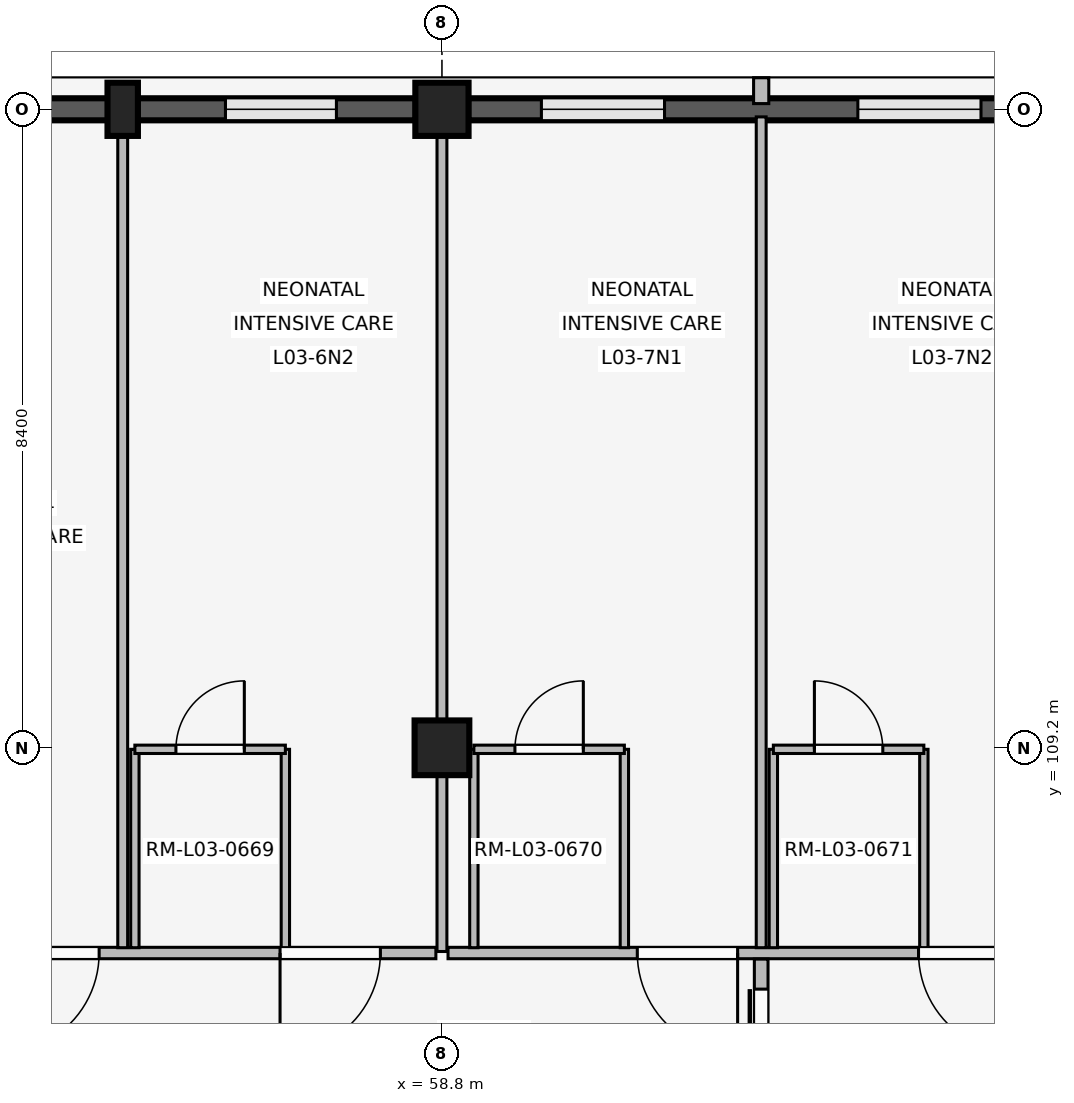
"""IFC4 building model, lengths in metres.
Left out: names, types, materials, properties, quantities, classifications, styles, units other than length and angle.
Written with IfcOpenShell. Run it as: python <this file> out.ifc"""

import sys

from ifc_helpers import new_model, si_unit, direction, frame, frame_2d, origin, origin_2d, place, context, subcontext, project, spatial, rectangle, extrude, element, fill, save


model = new_model("IFC4")
c1 = context("Model", 3, precision=1e-05, world=origin(), true_north=direction((0.0, 1.0)))
c2 = subcontext(c1, "Body", "Model", "MODEL_VIEW")
j1 = project(units=[si_unit("LENGTHUNIT", "METRE"), si_unit("PLANEANGLEUNIT", "RADIAN")], contexts=[c1])
p1 = place(None, origin())
s1 = spatial("IfcSite", under=j1, at=p1, CompositionType="ELEMENT")
p2 = place(p1, origin())
s2 = spatial("IfcBuilding", under=s1, at=p2, CompositionType="ELEMENT")
p3 = place(p2, frame((0.0, 0.0, 12.9)))
s3 = spatial("IfcBuildingStorey", under=s2, at=p3, CompositionType="ELEMENT", Elevation=12.9)
p4 = place(p3, frame((58.8, 109.2, 0.0), z_axis=(0.0, 0.0, 1.0), x_axis=(1.0, 0.0, 0.0)))
e1 = element("IfcColumn", 1, at=p4, inside=s3, PredefinedType="COLUMN", context=c2, shape_type="SweptSolid", body=[
    extrude(rectangle(XDim=0.72, YDim=0.72, at=origin_2d()), origin(), (0.0, 0.0, 1.0), 3.3),
])
p5 = place(p3, frame((58.8, 117.6, 0.0), z_axis=(0.0, 0.0, 1.0), x_axis=(1.0, 0.0, 0.0)))
e2 = element("IfcColumn", 2, at=p5, inside=s3, PredefinedType="COLUMN", context=c2, shape_type="SweptSolid", body=[
    extrude(rectangle(XDim=0.7, YDim=0.7, at=origin_2d()), origin(), (0.0, 0.0, 1.0), 3.3),
])
p6 = place(p3, frame((54.6, 117.6, 0.0), z_axis=(0.0, 0.0, 1.0), x_axis=(1.0, 0.0, 0.0)))
e3 = element("IfcColumn", 3, at=p6, inside=s3, PredefinedType="PILASTER", context=c2, shape_type="SweptSolid", body=[
    extrude(rectangle(XDim=0.4, YDim=0.7, at=origin_2d()), origin(), (0.0, 0.0, 1.0), 3.3),
])
p7 = place(p3, frame((50.745, 117.6, 0.0), z_axis=(0.0, 0.0, 1.0), x_axis=(1.0, 0.0, 0.0)))
e4 = element("IfcWall", 4, at=p7, inside=s3, PredefinedType="SOLIDWALL", context=c2, shape_type="SweptSolid", body=[
    extrude(rectangle(XDim=7.71, YDim=0.29, at=frame_2d((3.855, 0.0))), origin(), (0.0, 0.0, 1.0), 2.44),
])
p8 = place(p7, frame((1.043, 0.0, 0.85)))
e5 = element("IfcOpeningElement", 5, at=p8, cuts=e4, PredefinedType="OPENING", context=c2, shape_type="SweptSolid", body=[
    extrude(rectangle(XDim=1.46, YDim=0.85, at=frame_2d((0.73, 0.425))), frame((0.0, 0.155, 0.0), z_axis=(0.0, -1.0, 0.0), x_axis=(1.0, 0.0, 0.0)), (0.0, 0.0, 1.0), 0.31),
])
p9 = place(p7, frame((5.207, 0.0, 0.85)))
e6 = element("IfcOpeningElement", 6, at=p9, cuts=e4, PredefinedType="OPENING", context=c2, shape_type="SweptSolid", body=[
    extrude(rectangle(XDim=1.46, YDim=0.85, at=frame_2d((0.73, 0.425))), frame((0.0, 0.155, 0.0), z_axis=(0.0, -1.0, 0.0), x_axis=(1.0, 0.0, 0.0)), (0.0, 0.0, 1.0), 0.31),
])
p10 = place(p3, frame((59.145, 117.6, 0.0), z_axis=(0.0, 0.0, 1.0), x_axis=(1.0, 0.0, 0.0)))
e7 = element("IfcWall", 7, at=p10, inside=s3, PredefinedType="SOLIDWALL", context=c2, shape_type="SweptSolid", body=[
    extrude(rectangle(XDim=7.71, YDim=0.29, at=frame_2d((3.855, 0.0))), origin(), (0.0, 0.0, 1.0), 2.44),
])
p11 = place(p10, frame((0.963, 0.0, 0.85)))
e8 = element("IfcOpeningElement", 8, at=p11, cuts=e7, PredefinedType="OPENING", context=c2, shape_type="SweptSolid", body=[
    extrude(rectangle(XDim=1.62, YDim=0.95, at=frame_2d((0.81, 0.475))), frame((0.0, 0.155, 0.0), z_axis=(0.0, -1.0, 0.0), x_axis=(1.0, 0.0, 0.0)), (0.0, 0.0, 1.0), 0.31),
])
p12 = place(p10, frame((5.127, 0.0, 0.85)))
e9 = element("IfcOpeningElement", 9, at=p12, cuts=e7, PredefinedType="OPENING", context=c2, shape_type="SweptSolid", body=[
    extrude(rectangle(XDim=1.62, YDim=0.95, at=frame_2d((0.81, 0.475))), frame((0.0, 0.155, 0.0), z_axis=(0.0, -1.0, 0.0), x_axis=(1.0, 0.0, 0.0)), (0.0, 0.0, 1.0), 0.31),
])
p13 = place(p3, frame((63.0, 117.675, 0.0), z_axis=(0.0, 0.0, 1.0), x_axis=(0.0, 1.0, 0.0)))
e10 = element("IfcWall", 10, at=p13, inside=s3, PredefinedType="ELEMENTEDWALL", context=c2, shape_type="SweptSolid", body=[
    extrude(rectangle(XDim=0.34, YDim=0.2, at=frame_2d((0.17, 0.0))), origin(), (0.0, 0.0, 1.0), 2.42),
])
p14 = place(p3, frame((58.72, 106.5, 0.0), z_axis=(0.0, 0.0, 1.0), x_axis=(-1.0, 0.0, 0.0)))
e11 = element("IfcWall", 11, at=p14, inside=s3, PredefinedType="PARTITIONING", context=c2, shape_type="SweptSolid", body=[
    extrude(rectangle(XDim=7.96, YDim=0.15, at=frame_2d((3.98, 0.0))), origin(), (0.0, 0.0, 1.0), 2.42),
])
p15 = place(p14, frame((0.73, 0.0, 0.0)))
e12 = element("IfcOpeningElement", 12, at=p15, cuts=e11, PredefinedType="OPENING", context=c2, shape_type="SweptSolid", body=[
    extrude(rectangle(XDim=1.32, YDim=2.25, at=frame_2d((0.66, 1.125))), frame((0.0, 0.085, 0.0), z_axis=(0.0, -1.0, 0.0), x_axis=(1.0, 0.0, 0.0)), (0.0, 0.0, 1.0), 0.17),
])
p16 = place(p14, frame((4.43, 0.0, 0.0)))
e13 = element("IfcOpeningElement", 13, at=p16, cuts=e11, PredefinedType="OPENING", context=c2, shape_type="SweptSolid", body=[
    extrude(rectangle(XDim=1.32, YDim=2.25, at=frame_2d((0.66, 1.125))), frame((0.0, 0.085, 0.0), z_axis=(0.0, -1.0, 0.0), x_axis=(1.0, 0.0, 0.0)), (0.0, 0.0, 1.0), 0.17),
])
p17 = place(p3, frame((54.6, 106.57, 0.0), z_axis=(0.0, 0.0, 1.0), x_axis=(0.0, 1.0, 0.0)))
e14 = element("IfcWall", 14, at=p17, inside=s3, PredefinedType="PARTITIONING", context=c2, shape_type="SweptSolid", body=[
    extrude(rectangle(XDim=10.93, YDim=0.13, at=frame_2d((5.465, 0.0))), origin(), (0.0, 0.0, 1.0), 2.42),
])
for number, where, z_axis, x_axis in (
    (15, (54.76, 106.57, 0.0), (0.0, 0.0, 1.0), (0.0, 1.0, 0.0)),
    (16, (56.74, 106.57, 0.0), (0.0, 0.0, 1.0), (0.0, 1.0, 0.0)),
):
    element("IfcWall", number, at=place(p3, frame(where, z_axis=z_axis, x_axis=x_axis)), inside=s3, PredefinedType="PARTITIONING", context=c2, shape_type="SweptSolid", body=[
        extrude(rectangle(XDim=2.61, YDim=0.11, at=frame_2d((1.305, 0.0))), origin(), (0.0, 0.0, 1.0), 2.42),
    ])
p18 = place(p3, frame((54.76, 109.18, 0.0), z_axis=(0.0, 0.0, 1.0), x_axis=(1.0, 0.0, 0.0)))
e17 = element("IfcWall", 17, at=p18, inside=s3, PredefinedType="PARTITIONING", context=c2, shape_type="SweptSolid", body=[
    extrude(rectangle(XDim=1.98, YDim=0.11, at=frame_2d((0.99, 0.0))), origin(), (0.0, 0.0, 1.0), 2.42),
])
p19 = place(p18, frame((0.54, 0.0, 0.0)))
e18 = element("IfcOpeningElement", 18, at=p19, cuts=e17, PredefinedType="OPENING", context=c2, shape_type="SweptSolid", body=[
    extrude(rectangle(XDim=0.9, YDim=2.1, at=frame_2d((0.45, 1.05))), frame((0.0, 0.065, 0.0), z_axis=(0.0, -1.0, 0.0), x_axis=(1.0, 0.0, 0.0)), (0.0, 0.0, 1.0), 0.13),
])
p20 = place(p3, frame((58.8, 106.52, 0.0), z_axis=(0.0, 0.0, 1.0), x_axis=(0.0, 1.0, 0.0)))
e19 = element("IfcWall", 19, at=p20, inside=s3, PredefinedType="PARTITIONING", context=c2, shape_type="SweptSolid", body=[
    extrude(rectangle(XDim=10.94, YDim=0.13, at=frame_2d((5.47, 0.0))), origin(), (0.0, 0.0, 1.0), 2.42),
])
p21 = place(p3, frame((67.12, 106.5, 0.0), z_axis=(0.0, 0.0, 1.0), x_axis=(-1.0, 0.0, 0.0)))
e20 = element("IfcWall", 20, at=p21, inside=s3, PredefinedType="PARTITIONING", context=c2, shape_type="SweptSolid", body=[
    extrude(rectangle(XDim=8.24, YDim=0.15, at=frame_2d((4.12, 0.0))), origin(), (0.0, 0.0, 1.0), 2.42),
])
p22 = place(p21, frame((0.73, 0.0, 0.0)))
e21 = element("IfcOpeningElement", 21, at=p22, cuts=e20, PredefinedType="OPENING", context=c2, shape_type="SweptSolid", body=[
    extrude(rectangle(XDim=1.32, YDim=2.25, at=frame_2d((0.66, 1.125))), frame((0.0, 0.085, 0.0), z_axis=(0.0, -1.0, 0.0), x_axis=(1.0, 0.0, 0.0)), (0.0, 0.0, 1.0), 0.17),
])
p23 = place(p21, frame((4.43, 0.0, 0.0)))
e22 = element("IfcOpeningElement", 22, at=p23, cuts=e20, PredefinedType="OPENING", context=c2, shape_type="SweptSolid", body=[
    extrude(rectangle(XDim=1.32, YDim=2.25, at=frame_2d((0.66, 1.125))), frame((0.0, 0.085, 0.0), z_axis=(0.0, -1.0, 0.0), x_axis=(1.0, 0.0, 0.0)), (0.0, 0.0, 1.0), 0.17),
])
p24 = place(p3, frame((63.0, 106.57, 0.0), z_axis=(0.0, 0.0, 1.0), x_axis=(0.0, 1.0, 0.0)))
e23 = element("IfcWall", 23, at=p24, inside=s3, PredefinedType="PARTITIONING", context=c2, shape_type="SweptSolid", body=[
    extrude(rectangle(XDim=10.93, YDim=0.13, at=frame_2d((5.465, 0.0))), origin(), (0.0, 0.0, 1.0), 2.42),
])
for number, where, z_axis, x_axis in (
    (24, (59.22, 106.57, 0.0), (0.0, 0.0, 1.0), (0.0, 1.0, 0.0)),
    (25, (61.2, 106.57, 0.0), (0.0, 0.0, 1.0), (0.0, 1.0, 0.0)),
):
    element("IfcWall", number, at=place(p3, frame(where, z_axis=z_axis, x_axis=x_axis)), inside=s3, PredefinedType="PARTITIONING", context=c2, shape_type="SweptSolid", body=[
        extrude(rectangle(XDim=2.61, YDim=0.11, at=frame_2d((1.305, 0.0))), origin(), (0.0, 0.0, 1.0), 2.42),
    ])
p25 = place(p3, frame((59.22, 109.18, 0.0), z_axis=(0.0, 0.0, 1.0), x_axis=(1.0, 0.0, 0.0)))
e26 = element("IfcWall", 26, at=p25, inside=s3, PredefinedType="PARTITIONING", context=c2, shape_type="SweptSolid", body=[
    extrude(rectangle(XDim=1.98, YDim=0.11, at=frame_2d((0.99, 0.0))), origin(), (0.0, 0.0, 1.0), 2.42),
])
p26 = place(p25, frame((0.54, 0.0, 0.0)))
e27 = element("IfcOpeningElement", 27, at=p26, cuts=e26, PredefinedType="OPENING", context=c2, shape_type="SweptSolid", body=[
    extrude(rectangle(XDim=0.9, YDim=2.1, at=frame_2d((0.45, 1.05))), frame((0.0, 0.065, 0.0), z_axis=(0.0, -1.0, 0.0), x_axis=(1.0, 0.0, 0.0)), (0.0, 0.0, 1.0), 0.13),
])
for number, where, z_axis, x_axis in (
    (28, (63.16, 106.57, 0.0), (0.0, 0.0, 1.0), (0.0, 1.0, 0.0)),
    (29, (65.14, 106.57, 0.0), (0.0, 0.0, 1.0), (0.0, 1.0, 0.0)),
):
    element("IfcWall", number, at=place(p3, frame(where, z_axis=z_axis, x_axis=x_axis)), inside=s3, PredefinedType="PARTITIONING", context=c2, shape_type="SweptSolid", body=[
        extrude(rectangle(XDim=2.61, YDim=0.11, at=frame_2d((1.305, 0.0))), origin(), (0.0, 0.0, 1.0), 2.42),
    ])
p27 = place(p3, frame((63.16, 109.18, 0.0), z_axis=(0.0, 0.0, 1.0), x_axis=(1.0, 0.0, 0.0)))
e30 = element("IfcWall", 30, at=p27, inside=s3, PredefinedType="PARTITIONING", context=c2, shape_type="SweptSolid", body=[
    extrude(rectangle(XDim=1.98, YDim=0.11, at=frame_2d((0.99, 0.0))), origin(), (0.0, 0.0, 1.0), 2.42),
])
p28 = place(p27, frame((0.54, 0.0, 0.0)))
e31 = element("IfcOpeningElement", 31, at=p28, cuts=e30, PredefinedType="OPENING", context=c2, shape_type="SweptSolid", body=[
    extrude(rectangle(XDim=0.9, YDim=2.1, at=frame_2d((0.45, 1.05))), frame((0.0, 0.065, 0.0), z_axis=(0.0, -1.0, 0.0), x_axis=(1.0, 0.0, 0.0)), (0.0, 0.0, 1.0), 0.13),
])
p29 = place(p3, frame((63.0, 103.58, 0.0), z_axis=(0.0, 0.0, 1.0), x_axis=(0.0, 1.0, 0.0)))
e32 = element("IfcWall", 32, at=p29, inside=s3, PredefinedType="PARTITIONING", context=c2, shape_type="SweptSolid", body=[
    extrude(rectangle(XDim=2.84, YDim=0.18, at=frame_2d((1.42, 0.0))), origin(), (0.0, 0.0, 1.0), 2.42),
])
p30 = place(p29, frame((0.395, 0.0, 0.0)))
e33 = element("IfcOpeningElement", 33, at=p30, cuts=e32, PredefinedType="OPENING", context=c2, shape_type="SweptSolid", body=[
    extrude(rectangle(XDim=2.05, YDim=2.35, at=frame_2d((1.025, 1.175))), frame((0.0, 0.1, 0.0), z_axis=(0.0, -1.0, 0.0), x_axis=(1.0, 0.0, 0.0)), (0.0, 0.0, 1.0), 0.2),
])
p31 = place(p9, origin())
e34 = element("IfcWindow", 34, at=p31, inside=s3, PartitioningType="SINGLE_PANEL", PredefinedType="WINDOW", context=c2, shape_type="SweptSolid", body=[
    extrude(rectangle(XDim=1.46, YDim=0.85, at=frame_2d((0.73, 0.425))), frame((0.0, 0.03, 0.0), z_axis=(0.0, -1.0, 0.0), x_axis=(1.0, 0.0, 0.0)), (0.0, 0.0, 1.0), 0.06),
])
fill(e6, e34)
p32 = place(p11, origin())
e35 = element("IfcWindow", 35, at=p32, inside=s3, PartitioningType="SINGLE_PANEL", PredefinedType="WINDOW", context=c2, shape_type="SweptSolid", body=[
    extrude(rectangle(XDim=1.62, YDim=0.95, at=frame_2d((0.81, 0.475))), frame((0.0, 0.03, 0.0), z_axis=(0.0, -1.0, 0.0), x_axis=(1.0, 0.0, 0.0)), (0.0, 0.0, 1.0), 0.06),
])
fill(e8, e35)
p33 = place(p12, origin())
e36 = element("IfcWindow", 36, at=p33, inside=s3, PartitioningType="SINGLE_PANEL", PredefinedType="WINDOW", context=c2, shape_type="SweptSolid", body=[
    extrude(rectangle(XDim=1.62, YDim=0.95, at=frame_2d((0.81, 0.475))), frame((0.0, 0.03, 0.0), z_axis=(0.0, -1.0, 0.0), x_axis=(1.0, 0.0, 0.0)), (0.0, 0.0, 1.0), 0.06),
])
fill(e9, e36)
p34 = place(p15, origin())
e37 = element("IfcDoor", 37, at=p34, inside=s3, OperationType="SINGLE_SWING_RIGHT", PredefinedType="DOOR", context=c2, shape_type="SweptSolid", body=[
    extrude(rectangle(XDim=1.32, YDim=2.25, at=frame_2d((0.66, 1.125))), frame((0.0, 0.025, 0.0), z_axis=(0.0, -1.0, 0.0), x_axis=(1.0, 0.0, 0.0)), (0.0, 0.0, 1.0), 0.05),
])
fill(e12, e37)
p35 = place(p16, origin())
e38 = element("IfcDoor", 38, at=p35, inside=s3, OperationType="SINGLE_SWING_RIGHT", PredefinedType="DOOR", context=c2, shape_type="SweptSolid", body=[
    extrude(rectangle(XDim=1.32, YDim=2.25, at=frame_2d((0.66, 1.125))), frame((0.0, 0.025, 0.0), z_axis=(0.0, -1.0, 0.0), x_axis=(1.0, 0.0, 0.0)), (0.0, 0.0, 1.0), 0.05),
])
fill(e13, e38)
p36 = place(p19, origin())
e39 = element("IfcDoor", 39, at=p36, inside=s3, OperationType="SINGLE_SWING_RIGHT", PredefinedType="DOOR", context=c2, shape_type="SweptSolid", body=[
    extrude(rectangle(XDim=0.9, YDim=2.1, at=frame_2d((0.45, 1.05))), frame((0.0, 0.025, 0.0), z_axis=(0.0, -1.0, 0.0), x_axis=(1.0, 0.0, 0.0)), (0.0, 0.0, 1.0), 0.05),
])
fill(e18, e39)
p37 = place(p22, origin())
e40 = element("IfcDoor", 40, at=p37, inside=s3, OperationType="SINGLE_SWING_LEFT", PredefinedType="DOOR", context=c2, shape_type="SweptSolid", body=[
    extrude(rectangle(XDim=1.32, YDim=2.25, at=frame_2d((0.66, 1.125))), frame((0.0, 0.025, 0.0), z_axis=(0.0, -1.0, 0.0), x_axis=(1.0, 0.0, 0.0)), (0.0, 0.0, 1.0), 0.05),
])
fill(e21, e40)
p38 = place(p23, origin())
e41 = element("IfcDoor", 41, at=p38, inside=s3, OperationType="SINGLE_SWING_LEFT", PredefinedType="DOOR", context=c2, shape_type="SweptSolid", body=[
    extrude(rectangle(XDim=1.32, YDim=2.25, at=frame_2d((0.66, 1.125))), frame((0.0, 0.025, 0.0), z_axis=(0.0, -1.0, 0.0), x_axis=(1.0, 0.0, 0.0)), (0.0, 0.0, 1.0), 0.05),
])
fill(e22, e41)
p39 = place(p26, origin())
e42 = element("IfcDoor", 42, at=p39, inside=s3, OperationType="SINGLE_SWING_RIGHT", PredefinedType="DOOR", context=c2, shape_type="SweptSolid", body=[
    extrude(rectangle(XDim=0.9, YDim=2.1, at=frame_2d((0.45, 1.05))), frame((0.0, 0.025, 0.0), z_axis=(0.0, -1.0, 0.0), x_axis=(1.0, 0.0, 0.0)), (0.0, 0.0, 1.0), 0.05),
])
fill(e27, e42)
p40 = place(p28, origin())
e43 = element("IfcDoor", 43, at=p40, inside=s3, OperationType="SINGLE_SWING_LEFT", PredefinedType="DOOR", context=c2, shape_type="SweptSolid", body=[
    extrude(rectangle(XDim=0.9, YDim=2.1, at=frame_2d((0.45, 1.05))), frame((0.0, 0.025, 0.0), z_axis=(0.0, -1.0, 0.0), x_axis=(1.0, 0.0, 0.0)), (0.0, 0.0, 1.0), 0.05),
])
fill(e31, e43)
p41 = place(p30, origin())
e44 = element("IfcDoor", 44, at=p41, inside=s3, OperationType="SLIDING_TO_LEFT", PredefinedType="DOOR", context=c2, shape_type="SweptSolid", body=[
    extrude(rectangle(XDim=2.05, YDim=2.35, at=frame_2d((1.025, 1.175))), frame((0.0, 0.025, 0.0), z_axis=(0.0, -1.0, 0.0), x_axis=(1.0, 0.0, 0.0)), (0.0, 0.0, 1.0), 0.05),
])
fill(e33, e44)
save(model, sys.argv[1])
